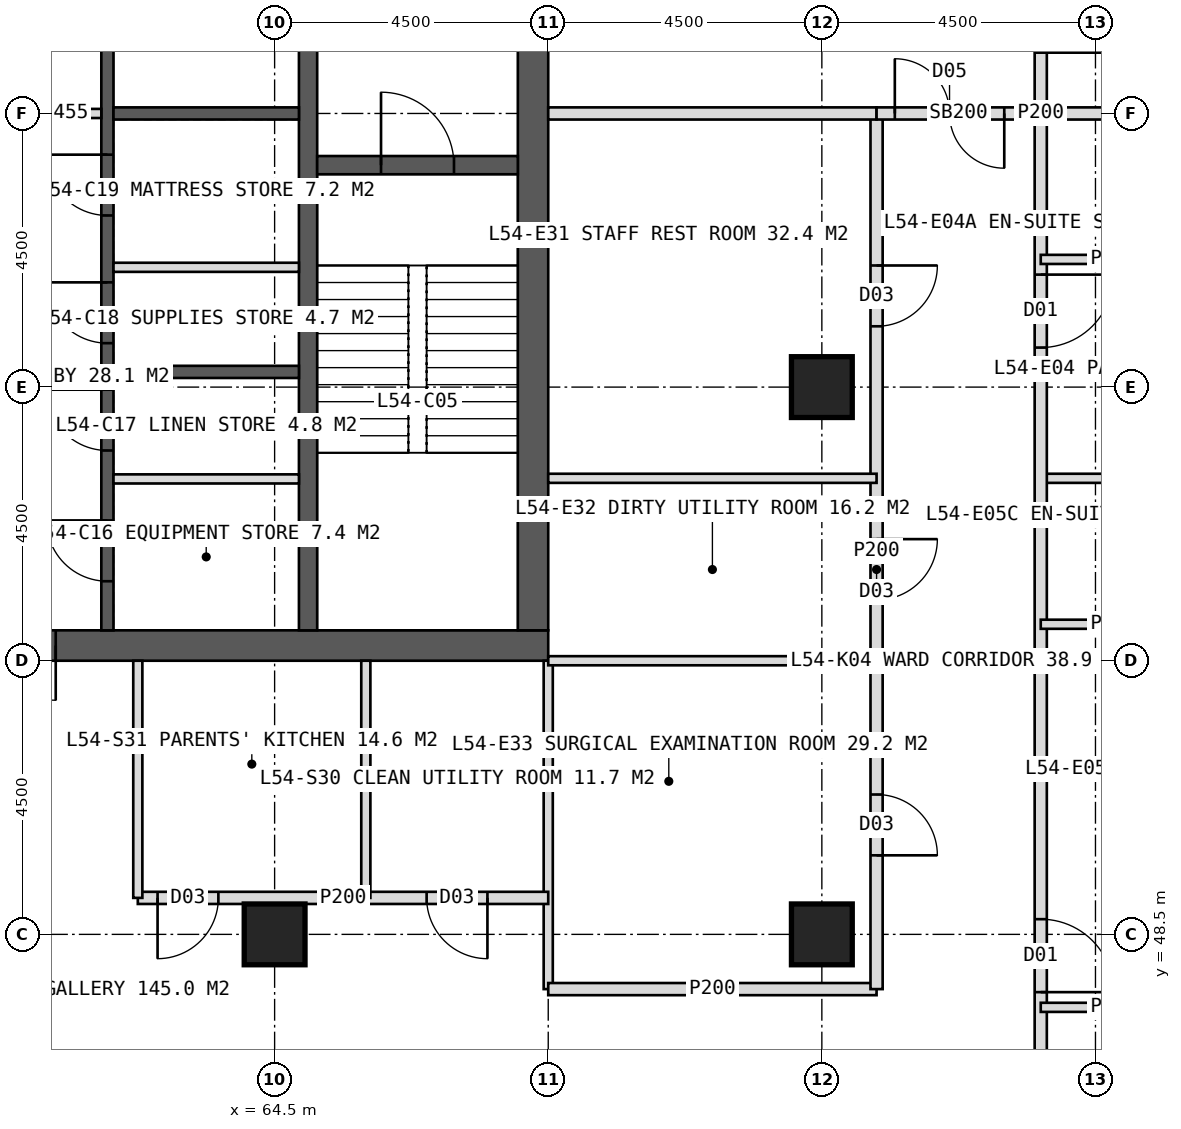
"""IFC4 building model, lengths in metres.
Left out: names, types, materials, properties, quantities, classifications, styles, units other than length and angle.
Written with IfcOpenShell. Run it as: python <this file> out.ifc"""

import sys

from ifc_helpers import new_model, si_unit, direction, frame, frame_2d, origin, origin_2d, place, context, subcontext, project, spatial, rectangle, hollow_rectangle, extrude, element, fill, save


model = new_model("IFC4")
c1 = context("Model", 3, precision=1e-05, world=origin(), true_north=direction((0.0, 1.0)))
c2 = subcontext(c1, "Body", "Model", "MODEL_VIEW")
j1 = project(units=[si_unit("LENGTHUNIT", "METRE"), si_unit("PLANEANGLEUNIT", "RADIAN")], contexts=[c1])
p1 = place(None, origin())
s1 = spatial("IfcSite", under=j1, at=p1, CompositionType="ELEMENT")
p2 = place(p1, origin())
s2 = spatial("IfcBuilding", under=s1, at=p2, CompositionType="ELEMENT")
p3 = place(p2, frame((0.0, 0.0, 225.0)))
s3 = spatial("IfcBuildingStorey", under=s2, at=p3, CompositionType="ELEMENT", Elevation=225.0)
p4 = place(p3, frame((51.0, 53.25, 0.0), z_axis=(0.0, 0.0, 1.0), x_axis=(1.0, 0.0, 0.0)))
e1 = element("IfcWall", 1, at=p4, inside=s3, PredefinedType="SHEAR", context=c2, shape_type="SweptSolid", body=[
    extrude(rectangle(XDim=18.0, YDim=0.5, at=frame_2d((9.0, 0.0))), origin(), (0.0, 0.0, 1.0), 4.0),
])
p5 = place(p4, frame((8.1, 0.0, 0.0)))
e2 = element("IfcOpeningElement", 2, at=p5, cuts=e1, PredefinedType="OPENING", context=c2, shape_type="SweptSolid", body=[
    extrude(rectangle(XDim=1.8, YDim=2.2, at=frame_2d((0.9, 1.1))), frame((0.0, 0.26, 0.0), z_axis=(0.0, -1.0, 0.0), x_axis=(1.0, 0.0, 0.0)), (0.0, 0.0, 1.0), 0.52),
])
p6 = place(p3, frame((68.75, 53.5, 0.0), z_axis=(0.0, 0.0, 1.0), x_axis=(0.0, 1.0, 0.0)))
e3 = element("IfcWall", 3, at=p6, inside=s3, PredefinedType="SHEAR", context=c2, shape_type="SweptSolid", body=[
    extrude(rectangle(XDim=17.0, YDim=0.5, at=frame_2d((8.5, 0.0))), origin(), (0.0, 0.0, 1.0), 4.0),
])
p7 = place(p6, frame((9.6, 0.0, 0.0)))
e4 = element("IfcOpeningElement", 4, at=p7, cuts=e3, PredefinedType="OPENING", context=c2, shape_type="SweptSolid", body=[
    extrude(rectangle(XDim=1.5, YDim=2.2, at=frame_2d((0.75, 1.1))), frame((0.0, 0.26, 0.0), z_axis=(0.0, -1.0, 0.0), x_axis=(1.0, 0.0, 0.0)), (0.0, 0.0, 1.0), 0.52),
])
p8 = place(p3, frame((65.05, 53.5, 0.0), z_axis=(0.0, 0.0, 1.0), x_axis=(0.0, 1.0, 0.0)))
e5 = element("IfcWall", 5, at=p8, inside=s3, PredefinedType="SHEAR", context=c2, shape_type="SweptSolid", body=[
    extrude(rectangle(XDim=17.0, YDim=0.3, at=frame_2d((8.5, 0.0))), origin(), (0.0, 0.0, 1.0), 4.0),
])
p9 = place(p3, frame((61.75, 53.5, 0.0), z_axis=(0.0, 0.0, 1.0), x_axis=(0.0, 1.0, 0.0)))
e6 = element("IfcWall", 6, at=p9, inside=s3, PredefinedType="SHEAR", context=c2, shape_type="SweptSolid", body=[
    extrude(rectangle(XDim=17.0, YDim=0.2, at=frame_2d((8.5, 0.0))), origin(), (0.0, 0.0, 1.0), 4.0),
])
p10 = place(p9, frame((0.808, 0.0, 0.0)))
e7 = element("IfcOpeningElement", 7, at=p10, cuts=e6, PredefinedType="OPENING", context=c2, shape_type="SweptSolid", body=[
    extrude(rectangle(XDim=1.0, YDim=2.1, at=frame_2d((0.5, 1.05))), frame((0.0, 0.11, 0.0), z_axis=(0.0, -1.0, 0.0), x_axis=(1.0, 0.0, 0.0)), (0.0, 0.0, 1.0), 0.22),
])
p11 = place(p9, frame((2.958, 0.0, 0.0)))
e8 = element("IfcOpeningElement", 8, at=p11, cuts=e6, PredefinedType="OPENING", context=c2, shape_type="SweptSolid", body=[
    extrude(rectangle(XDim=1.0, YDim=2.1, at=frame_2d((0.5, 1.05))), frame((0.0, 0.11, 0.0), z_axis=(0.0, -1.0, 0.0), x_axis=(1.0, 0.0, 0.0)), (0.0, 0.0, 1.0), 0.22),
])
p12 = place(p9, frame((4.722, 0.0, 0.0)))
e9 = element("IfcOpeningElement", 9, at=p12, cuts=e6, PredefinedType="OPENING", context=c2, shape_type="SweptSolid", body=[
    extrude(rectangle(XDim=1.0, YDim=2.1, at=frame_2d((0.5, 1.05))), frame((0.0, 0.11, 0.0), z_axis=(0.0, -1.0, 0.0), x_axis=(1.0, 0.0, 0.0)), (0.0, 0.0, 1.0), 0.22),
])
p13 = place(p9, frame((6.823, 0.0, 0.0)))
e10 = element("IfcOpeningElement", 10, at=p13, cuts=e6, PredefinedType="OPENING", context=c2, shape_type="SweptSolid", body=[
    extrude(rectangle(XDim=1.0, YDim=2.1, at=frame_2d((0.5, 1.05))), frame((0.0, 0.11, 0.0), z_axis=(0.0, -1.0, 0.0), x_axis=(1.0, 0.0, 0.0)), (0.0, 0.0, 1.0), 0.22),
])
p14 = place(p9, frame((10.025, 0.0, 0.0)))
e11 = element("IfcOpeningElement", 11, at=p14, cuts=e6, PredefinedType="OPENING", context=c2, shape_type="SweptSolid", body=[
    extrude(rectangle(XDim=1.4, YDim=2.2, at=frame_2d((0.7, 1.1))), frame((0.0, 0.11, 0.0), z_axis=(0.0, -1.0, 0.0), x_axis=(1.0, 0.0, 0.0)), (0.0, 0.0, 1.0), 0.22),
])
p15 = place(p9, frame((14.325, 0.0, 0.0)))
e12 = element("IfcOpeningElement", 12, at=p15, cuts=e6, PredefinedType="OPENING", context=c2, shape_type="SweptSolid", body=[
    extrude(rectangle(XDim=1.4, YDim=2.2, at=frame_2d((0.7, 1.1))), frame((0.0, 0.11, 0.0), z_axis=(0.0, -1.0, 0.0), x_axis=(1.0, 0.0, 0.0)), (0.0, 0.0, 1.0), 0.22),
])
for number, where, z_axis, x_axis in (
    (13, (61.85, 57.75, 0.0), (0.0, 0.0, 1.0), (1.0, 0.0, 0.0)),
    (14, (61.85, 62.0, 0.0), (0.0, 0.0, 1.0), (1.0, 0.0, 0.0)),
):
    element("IfcWall", number, at=place(p3, frame(where, z_axis=z_axis, x_axis=x_axis)), inside=s3, PredefinedType="SHEAR", context=c2, shape_type="SweptSolid", body=[
        extrude(rectangle(XDim=3.05, YDim=0.2, at=frame_2d((1.525, 0.0))), origin(), (0.0, 0.0, 1.0), 4.0),
    ])
p16 = place(p3, frame((65.2, 61.15, 0.0), z_axis=(0.0, 0.0, 1.0), x_axis=(1.0, 0.0, 0.0)))
e15 = element("IfcWall", 15, at=p16, inside=s3, PredefinedType="SHEAR", context=c2, shape_type="SweptSolid", body=[
    extrude(rectangle(XDim=3.3, YDim=0.3, at=frame_2d((1.65, 0.0))), origin(), (0.0, 0.0, 1.0), 4.0),
])
p17 = place(p16, frame((1.05, 0.0, 0.0)))
e16 = element("IfcOpeningElement", 16, at=p17, cuts=e15, PredefinedType="OPENING", context=c2, shape_type="SweptSolid", body=[
    extrude(rectangle(XDim=1.2, YDim=2.1, at=frame_2d((0.6, 1.05))), frame((0.0, 0.16, 0.0), z_axis=(0.0, -1.0, 0.0), x_axis=(1.0, 0.0, 0.0)), (0.0, 0.0, 1.0), 0.32),
])
for number, where, z_axis, x_axis in (
    (17, (73.5, 48.5, 0.0), (0.0, 0.0, 1.0), (1.0, 0.0, 0.0)),
    (18, (64.5, 48.5, 0.0), (0.0, 0.0, 1.0), (1.0, 0.0, 0.0)),
    (19, (73.5, 57.5, 0.0), (0.0, 0.0, 1.0), (1.0, 0.0, 0.0)),
):
    element("IfcColumn", number, at=place(p3, frame(where, z_axis=z_axis, x_axis=x_axis)), inside=s3, PredefinedType="COLUMN", context=c2, shape_type="SweptSolid", body=[
        extrude(hollow_rectangle(XDim=1.0, YDim=1.0, WallThickness=0.1, at=origin_2d()), origin(), (0.0, 0.0, 1.0), 4.0),
    ])
p18 = place(p3, frame((69.0, 53.0, 0.0), z_axis=(0.0, 0.0, 1.0), x_axis=(0.0, -1.0, 0.0)))
e20 = element("IfcWall", 20, at=p18, inside=s3, PredefinedType="PARTITIONING", context=c2, shape_type="SweptSolid", body=[
    extrude(rectangle(XDim=5.4, YDim=0.15, at=frame_2d((2.7, 0.0))), origin(), (0.0, 0.0, 1.0), 3.75),
])
p19 = place(p3, frame((74.4, 47.6, 0.0), z_axis=(0.0, 0.0, 1.0), x_axis=(-1.0, 0.0, 0.0)))
e21 = element("IfcWall", 21, at=p19, inside=s3, PredefinedType="PARTITIONING", context=c2, shape_type="SweptSolid", body=[
    extrude(rectangle(XDim=5.4, YDim=0.2, at=frame_2d((2.7, 0.0))), origin(), (0.0, 0.0, 1.0), 3.75),
])
p20 = place(p3, frame((69.0, 49.1, 0.0), z_axis=(0.0, 0.0, 1.0), x_axis=(-1.0, 0.0, 0.0)))
e22 = element("IfcWall", 22, at=p20, inside=s3, PredefinedType="PARTITIONING", context=c2, shape_type="SweptSolid", body=[
    extrude(rectangle(XDim=6.75, YDim=0.2, at=frame_2d((3.375, 0.0))), origin(), (0.0, 0.0, 1.0), 3.75),
])
p21 = place(p20, frame((1.0, 0.0, 0.0)))
e23 = element("IfcOpeningElement", 23, at=p21, cuts=e22, PredefinedType="OPENING", context=c2, shape_type="SweptSolid", body=[
    extrude(rectangle(XDim=1.0, YDim=2.1, at=frame_2d((0.5, 1.05))), frame((0.0, 0.11, 0.0), z_axis=(0.0, -1.0, 0.0), x_axis=(1.0, 0.0, 0.0)), (0.0, 0.0, 1.0), 0.22),
])
p22 = place(p20, frame((5.425, 0.0, 0.0)))
e24 = element("IfcOpeningElement", 24, at=p22, cuts=e22, PredefinedType="OPENING", context=c2, shape_type="SweptSolid", body=[
    extrude(rectangle(XDim=1.0, YDim=2.1, at=frame_2d((0.5, 1.05))), frame((0.0, 0.11, 0.0), z_axis=(0.0, -1.0, 0.0), x_axis=(1.0, 0.0, 0.0)), (0.0, 0.0, 1.0), 0.22),
])
for number, where, z_axis, x_axis in (
    (25, (62.25, 53.0, 0.0), (0.0, 0.0, 1.0), (0.0, -1.0, 0.0)),
    (26, (66.0, 53.0, 0.0), (0.0, 0.0, 1.0), (0.0, -1.0, 0.0)),
):
    element("IfcWall", number, at=place(p3, frame(where, z_axis=z_axis, x_axis=x_axis)), inside=s3, PredefinedType="PARTITIONING", context=c2, shape_type="SweptSolid", body=[
        extrude(rectangle(XDim=3.9, YDim=0.15, at=frame_2d((1.95, 0.0))), origin(), (0.0, 0.0, 1.0), 3.75),
    ])
p23 = place(p3, frame((77.1, 62.0, 0.0), z_axis=(0.0, 0.0, 1.0), x_axis=(1.0, 0.0, 0.0)))
e27 = element("IfcWall", 27, at=p23, inside=s3, PredefinedType="SOLIDWALL", context=c2, shape_type="SweptSolid", body=[
    extrude(rectangle(XDim=5.25, YDim=0.2, at=frame_2d((2.625, 0.0))), origin(), (0.0, 0.0, 1.0), 2.95),
])
p24 = place(p3, frame((77.1, 56.0, 0.0), z_axis=(0.0, 0.0, 1.0), x_axis=(1.0, 0.0, 0.0)))
e28 = element("IfcWall", 28, at=p24, inside=s3, PredefinedType="PARTITIONING", context=c2, shape_type="SweptSolid", body=[
    extrude(rectangle(XDim=5.25, YDim=0.15, at=frame_2d((2.625, 0.0))), origin(), (0.0, 0.0, 1.0), 3.75),
])
p25 = place(p3, frame((77.1, 79.1, 0.0), z_axis=(0.0, 0.0, 1.0), x_axis=(0.0, -1.0, 0.0)))
e29 = element("IfcWall", 29, at=p25, inside=s3, PredefinedType="PARTITIONING", context=c2, shape_type="SweptSolid", body=[
    extrude(rectangle(XDim=34.2, YDim=0.2, at=frame_2d((17.1, 0.0))), origin(), (0.0, 0.0, 1.0), 3.75),
])
p26 = place(p25, frame((3.65, 0.0, 0.0)))
e30 = element("IfcOpeningElement", 30, at=p26, cuts=e29, PredefinedType="OPENING", context=c2, shape_type="SweptSolid", body=[
    extrude(rectangle(XDim=1.2, YDim=2.2, at=frame_2d((0.6, 1.1))), frame((0.0, 0.11, 0.0), z_axis=(0.0, -1.0, 0.0), x_axis=(1.0, 0.0, 0.0)), (0.0, 0.0, 1.0), 0.22),
])
p27 = place(p25, frame((10.75, 0.0, 0.0)))
e31 = element("IfcOpeningElement", 31, at=p27, cuts=e29, PredefinedType="OPENING", context=c2, shape_type="SweptSolid", body=[
    extrude(rectangle(XDim=1.2, YDim=2.2, at=frame_2d((0.6, 1.1))), frame((0.0, 0.11, 0.0), z_axis=(0.0, -1.0, 0.0), x_axis=(1.0, 0.0, 0.0)), (0.0, 0.0, 1.0), 0.22),
])
p28 = place(p25, frame((15.1, 0.0, 0.0)))
e32 = element("IfcOpeningElement", 32, at=p28, cuts=e29, PredefinedType="OPENING", context=c2, shape_type="SweptSolid", body=[
    extrude(rectangle(XDim=1.0, YDim=2.1, at=frame_2d((0.5, 1.05))), frame((0.0, 0.11, 0.0), z_axis=(0.0, -1.0, 0.0), x_axis=(1.0, 0.0, 0.0)), (0.0, 0.0, 1.0), 0.22),
])
p29 = place(p25, frame((19.75, 0.0, 0.0)))
e33 = element("IfcOpeningElement", 33, at=p29, cuts=e29, PredefinedType="OPENING", context=c2, shape_type="SweptSolid", body=[
    extrude(rectangle(XDim=1.2, YDim=2.2, at=frame_2d((0.6, 1.1))), frame((0.0, 0.11, 0.0), z_axis=(0.0, -1.0, 0.0), x_axis=(1.0, 0.0, 0.0)), (0.0, 0.0, 1.0), 0.22),
])
p30 = place(p25, frame((30.35, 0.0, 0.0)))
e34 = element("IfcOpeningElement", 34, at=p30, cuts=e29, PredefinedType="OPENING", context=c2, shape_type="SweptSolid", body=[
    extrude(rectangle(XDim=1.2, YDim=2.2, at=frame_2d((0.6, 1.1))), frame((0.0, 0.11, 0.0), z_axis=(0.0, -1.0, 0.0), x_axis=(1.0, 0.0, 0.0)), (0.0, 0.0, 1.0), 0.22),
])
for number, where, z_axis, x_axis in (
    (35, (77.1, 59.6, 0.0), (0.0, 0.0, 1.0), (1.0, 0.0, 0.0)),
    (36, (77.1, 47.3, 0.0), (0.0, 0.0, 1.0), (1.0, 0.0, 0.0)),
    (37, (77.1, 53.6, 0.0), (0.0, 0.0, 1.0), (1.0, 0.0, 0.0)),
):
    element("IfcWall", number, at=place(p3, frame(where, z_axis=z_axis, x_axis=x_axis)), inside=s3, PredefinedType="PARTITIONING", context=c2, shape_type="SweptSolid", body=[
        extrude(rectangle(XDim=2.4, YDim=0.15, at=frame_2d((1.2, 0.0))), origin(), (0.0, 0.0, 1.0), 3.75),
    ])
p31 = place(p3, frame((74.4, 62.0, 0.0), z_axis=(0.0, 0.0, 1.0), x_axis=(0.0, -1.0, 0.0)))
e38 = element("IfcWall", 38, at=p31, inside=s3, PredefinedType="PARTITIONING", context=c2, shape_type="SweptSolid", body=[
    extrude(rectangle(XDim=14.4, YDim=0.2, at=frame_2d((7.2, 0.0))), origin(), (0.0, 0.0, 1.0), 3.75),
])
p32 = place(p31, frame((2.5, 0.0, 0.0)))
e39 = element("IfcOpeningElement", 39, at=p32, cuts=e38, PredefinedType="OPENING", context=c2, shape_type="SweptSolid", body=[
    extrude(rectangle(XDim=1.0, YDim=2.1, at=frame_2d((0.5, 1.05))), frame((0.0, 0.11, 0.0), z_axis=(0.0, -1.0, 0.0), x_axis=(1.0, 0.0, 0.0)), (0.0, 0.0, 1.0), 0.22),
])
p33 = place(p31, frame((7.0, 0.0, 0.0)))
e40 = element("IfcOpeningElement", 40, at=p33, cuts=e38, PredefinedType="OPENING", context=c2, shape_type="SweptSolid", body=[
    extrude(rectangle(XDim=1.0, YDim=2.1, at=frame_2d((0.5, 1.05))), frame((0.0, 0.11, 0.0), z_axis=(0.0, -1.0, 0.0), x_axis=(1.0, 0.0, 0.0)), (0.0, 0.0, 1.0), 0.22),
])
p34 = place(p31, frame((11.2, 0.0, 0.0)))
e41 = element("IfcOpeningElement", 41, at=p34, cuts=e38, PredefinedType="OPENING", context=c2, shape_type="SweptSolid", body=[
    extrude(rectangle(XDim=1.0, YDim=2.1, at=frame_2d((0.5, 1.05))), frame((0.0, 0.11, 0.0), z_axis=(0.0, -1.0, 0.0), x_axis=(1.0, 0.0, 0.0)), (0.0, 0.0, 1.0), 0.22),
])
p35 = place(p3, frame((69.0, 62.0, 0.0), z_axis=(0.0, 0.0, 1.0), x_axis=(1.0, 0.0, 0.0)))
e42 = element("IfcWall", 42, at=p35, inside=s3, PredefinedType="SOLIDWALL", context=c2, shape_type="SweptSolid", body=[
    extrude(rectangle(XDim=5.4, YDim=0.2, at=frame_2d((2.7, 0.0))), origin(), (0.0, 0.0, 1.0), 2.95),
])
for number, where, z_axis, x_axis in (
    (43, (69.0, 56.0, 0.0), (0.0, 0.0, 1.0), (1.0, 0.0, 0.0)),
    (44, (69.0, 53.0, 0.0), (0.0, 0.0, 1.0), (1.0, 0.0, 0.0)),
):
    element("IfcWall", number, at=place(p3, frame(where, z_axis=z_axis, x_axis=x_axis)), inside=s3, PredefinedType="PARTITIONING", context=c2, shape_type="SweptSolid", body=[
        extrude(rectangle(XDim=5.4, YDim=0.15, at=frame_2d((2.7, 0.0))), origin(), (0.0, 0.0, 1.0), 3.75),
    ])
p36 = place(p3, frame((74.4, 62.0, 0.0), z_axis=(0.0, 0.0, 1.0), x_axis=(1.0, 0.0, 0.0)))
e45 = element("IfcWall", 45, at=p36, inside=s3, PredefinedType="SOLIDWALL", context=c2, shape_type="SweptSolid", body=[
    extrude(rectangle(XDim=2.7, YDim=0.2, at=frame_2d((1.35, 0.0))), origin(), (0.0, 0.0, 1.0), 2.95),
])
p37 = place(p36, frame((0.3, 0.0, 0.0)))
e46 = element("IfcOpeningElement", 46, at=p37, cuts=e45, PredefinedType="OPENING", context=c2, shape_type="SweptSolid", body=[
    extrude(rectangle(XDim=1.8, YDim=2.2, at=frame_2d((0.9, 1.1))), frame((0.0, 0.11, 0.0), z_axis=(0.0, -1.0, 0.0), x_axis=(1.0, 0.0, 0.0)), (0.0, 0.0, 1.0), 0.22),
])
for number, where, z_axis, x_axis in (
    (47, (61.85, 55.99, 0.0), (0.0, 0.0, 1.0), (1.0, 0.0, 0.0)),
    (48, (61.85, 59.47, 0.0), (0.0, 0.0, 1.0), (1.0, 0.0, 0.0)),
):
    element("IfcWall", number, at=place(p3, frame(where, z_axis=z_axis, x_axis=x_axis)), inside=s3, PredefinedType="PARTITIONING", context=c2, shape_type="SweptSolid", body=[
        extrude(rectangle(XDim=3.05, YDim=0.15, at=frame_2d((1.525, 0.0))), origin(), (0.0, 0.0, 1.0), 3.75),
    ])
p38 = place(p3, frame((58.35, 62.0, 0.0), z_axis=(0.0, 0.0, 1.0), x_axis=(1.0, 0.0, 0.0)))
e49 = element("IfcWall", 49, at=p38, inside=s3, PredefinedType="PARTITIONING", context=c2, shape_type="SweptSolid", body=[
    extrude(rectangle(XDim=3.3, YDim=0.15, at=frame_2d((1.65, 0.0))), origin(), (0.0, 0.0, 1.0), 3.75),
])
p39 = place(p21, origin())
e50 = element("IfcDoor", 50, at=p39, inside=s3, OperationType="SINGLE_SWING_LEFT", PredefinedType="DOOR", context=c2, shape_type="SweptSolid", body=[
    extrude(rectangle(XDim=1.0, YDim=2.1, at=frame_2d((0.5, 1.05))), frame((0.0, 0.025, 0.0), z_axis=(0.0, -1.0, 0.0), x_axis=(1.0, 0.0, 0.0)), (0.0, 0.0, 1.0), 0.05),
])
fill(e23, e50)
p40 = place(p22, origin())
e51 = element("IfcDoor", 51, at=p40, inside=s3, OperationType="SINGLE_SWING_RIGHT", PredefinedType="DOOR", context=c2, shape_type="SweptSolid", body=[
    extrude(rectangle(XDim=1.0, YDim=2.1, at=frame_2d((0.5, 1.05))), frame((0.0, 0.025, 0.0), z_axis=(0.0, -1.0, 0.0), x_axis=(1.0, 0.0, 0.0)), (0.0, 0.0, 1.0), 0.05),
])
fill(e24, e51)
p41 = place(p29, origin())
e52 = element("IfcDoor", 52, at=p41, inside=s3, OperationType="SINGLE_SWING_LEFT", PredefinedType="DOOR", context=c2, shape_type="SweptSolid", body=[
    extrude(rectangle(XDim=1.2, YDim=2.2, at=frame_2d((0.6, 1.1))), frame((0.0, 0.025, 0.0), z_axis=(0.0, -1.0, 0.0), x_axis=(1.0, 0.0, 0.0)), (0.0, 0.0, 1.0), 0.05),
])
fill(e33, e52)
p42 = place(p30, origin())
e53 = element("IfcDoor", 53, at=p42, inside=s3, OperationType="SINGLE_SWING_RIGHT", PredefinedType="DOOR", context=c2, shape_type="SweptSolid", body=[
    extrude(rectangle(XDim=1.2, YDim=2.2, at=frame_2d((0.6, 1.1))), frame((0.0, 0.025, 0.0), z_axis=(0.0, -1.0, 0.0), x_axis=(1.0, 0.0, 0.0)), (0.0, 0.0, 1.0), 0.05),
])
fill(e34, e53)
p43 = place(p32, origin())
e54 = element("IfcDoor", 54, at=p43, inside=s3, OperationType="SINGLE_SWING_LEFT", PredefinedType="DOOR", context=c2, shape_type="SweptSolid", body=[
    extrude(rectangle(XDim=1.0, YDim=2.1, at=frame_2d((0.5, 1.05))), frame((0.0, 0.025, 0.0), z_axis=(0.0, -1.0, 0.0), x_axis=(1.0, 0.0, 0.0)), (0.0, 0.0, 1.0), 0.05),
])
fill(e39, e54)
p44 = place(p33, origin())
e55 = element("IfcDoor", 55, at=p44, inside=s3, OperationType="SINGLE_SWING_LEFT", PredefinedType="DOOR", context=c2, shape_type="SweptSolid", body=[
    extrude(rectangle(XDim=1.0, YDim=2.1, at=frame_2d((0.5, 1.05))), frame((0.0, 0.025, 0.0), z_axis=(0.0, -1.0, 0.0), x_axis=(1.0, 0.0, 0.0)), (0.0, 0.0, 1.0), 0.05),
])
fill(e40, e55)
p45 = place(p34, origin())
e56 = element("IfcDoor", 56, at=p45, inside=s3, OperationType="SINGLE_SWING_RIGHT", PredefinedType="DOOR", context=c2, shape_type="SweptSolid", body=[
    extrude(rectangle(XDim=1.0, YDim=2.1, at=frame_2d((0.5, 1.05))), frame((0.0, 0.025, 0.0), z_axis=(0.0, -1.0, 0.0), x_axis=(1.0, 0.0, 0.0)), (0.0, 0.0, 1.0), 0.05),
])
fill(e41, e56)
p46 = place(p37, origin())
e57 = element("IfcDoor", 57, at=p46, inside=s3, OperationType="DOUBLE_DOOR_DOUBLE_SWING", PredefinedType="DOOR", context=c2, shape_type="SweptSolid", body=[
    extrude(rectangle(XDim=1.8, YDim=2.2, at=frame_2d((0.9, 1.1))), frame((0.0, 0.025, 0.0), z_axis=(0.0, -1.0, 0.0), x_axis=(1.0, 0.0, 0.0)), (0.0, 0.0, 1.0), 0.05),
])
fill(e46, e57)
p47 = place(p17, origin())
e58 = element("IfcDoor", 58, at=p47, inside=s3, OperationType="SINGLE_SWING_LEFT", PredefinedType="DOOR", context=c2, shape_type="SweptSolid", body=[
    extrude(rectangle(XDim=1.2, YDim=2.1, at=frame_2d((0.6, 1.05))), frame((0.0, 0.025, 0.0), z_axis=(0.0, -1.0, 0.0), x_axis=(1.0, 0.0, 0.0)), (0.0, 0.0, 1.0), 0.05),
])
fill(e16, e58)
p48 = place(p10, origin())
e59 = element("IfcDoor", 59, at=p48, inside=s3, OperationType="SINGLE_SWING_RIGHT", PredefinedType="DOOR", context=c2, shape_type="SweptSolid", body=[
    extrude(rectangle(XDim=1.0, YDim=2.1, at=frame_2d((0.5, 1.05))), frame((0.0, 0.025, 0.0), z_axis=(0.0, -1.0, 0.0), x_axis=(1.0, 0.0, 0.0)), (0.0, 0.0, 1.0), 0.05),
])
fill(e7, e59)
p49 = place(p11, origin())
e60 = element("IfcDoor", 60, at=p49, inside=s3, OperationType="SINGLE_SWING_RIGHT", PredefinedType="DOOR", context=c2, shape_type="SweptSolid", body=[
    extrude(rectangle(XDim=1.0, YDim=2.1, at=frame_2d((0.5, 1.05))), frame((0.0, 0.025, 0.0), z_axis=(0.0, -1.0, 0.0), x_axis=(1.0, 0.0, 0.0)), (0.0, 0.0, 1.0), 0.05),
])
fill(e8, e60)
p50 = place(p12, origin())
e61 = element("IfcDoor", 61, at=p50, inside=s3, OperationType="SINGLE_SWING_RIGHT", PredefinedType="DOOR", context=c2, shape_type="SweptSolid", body=[
    extrude(rectangle(XDim=1.0, YDim=2.1, at=frame_2d((0.5, 1.05))), frame((0.0, 0.025, 0.0), z_axis=(0.0, -1.0, 0.0), x_axis=(1.0, 0.0, 0.0)), (0.0, 0.0, 1.0), 0.05),
])
fill(e9, e61)
p51 = place(p13, origin())
e62 = element("IfcDoor", 62, at=p51, inside=s3, OperationType="SINGLE_SWING_RIGHT", PredefinedType="DOOR", context=c2, shape_type="SweptSolid", body=[
    extrude(rectangle(XDim=1.0, YDim=2.1, at=frame_2d((0.5, 1.05))), frame((0.0, 0.025, 0.0), z_axis=(0.0, -1.0, 0.0), x_axis=(1.0, 0.0, 0.0)), (0.0, 0.0, 1.0), 0.05),
])
fill(e10, e62)
p52 = place(p5, origin())
e63 = element("IfcDoor", 63, at=p52, inside=s3, OperationType="DOUBLE_DOOR_SINGLE_SWING", PredefinedType="DOOR", context=c2, shape_type="SweptSolid", body=[
    extrude(rectangle(XDim=1.8, YDim=2.2, at=frame_2d((0.9, 1.1))), frame((0.0, 0.025, 0.0), z_axis=(0.0, -1.0, 0.0), x_axis=(1.0, 0.0, 0.0)), (0.0, 0.0, 1.0), 0.05),
])
fill(e2, e63)
save(model, sys.argv[1])
